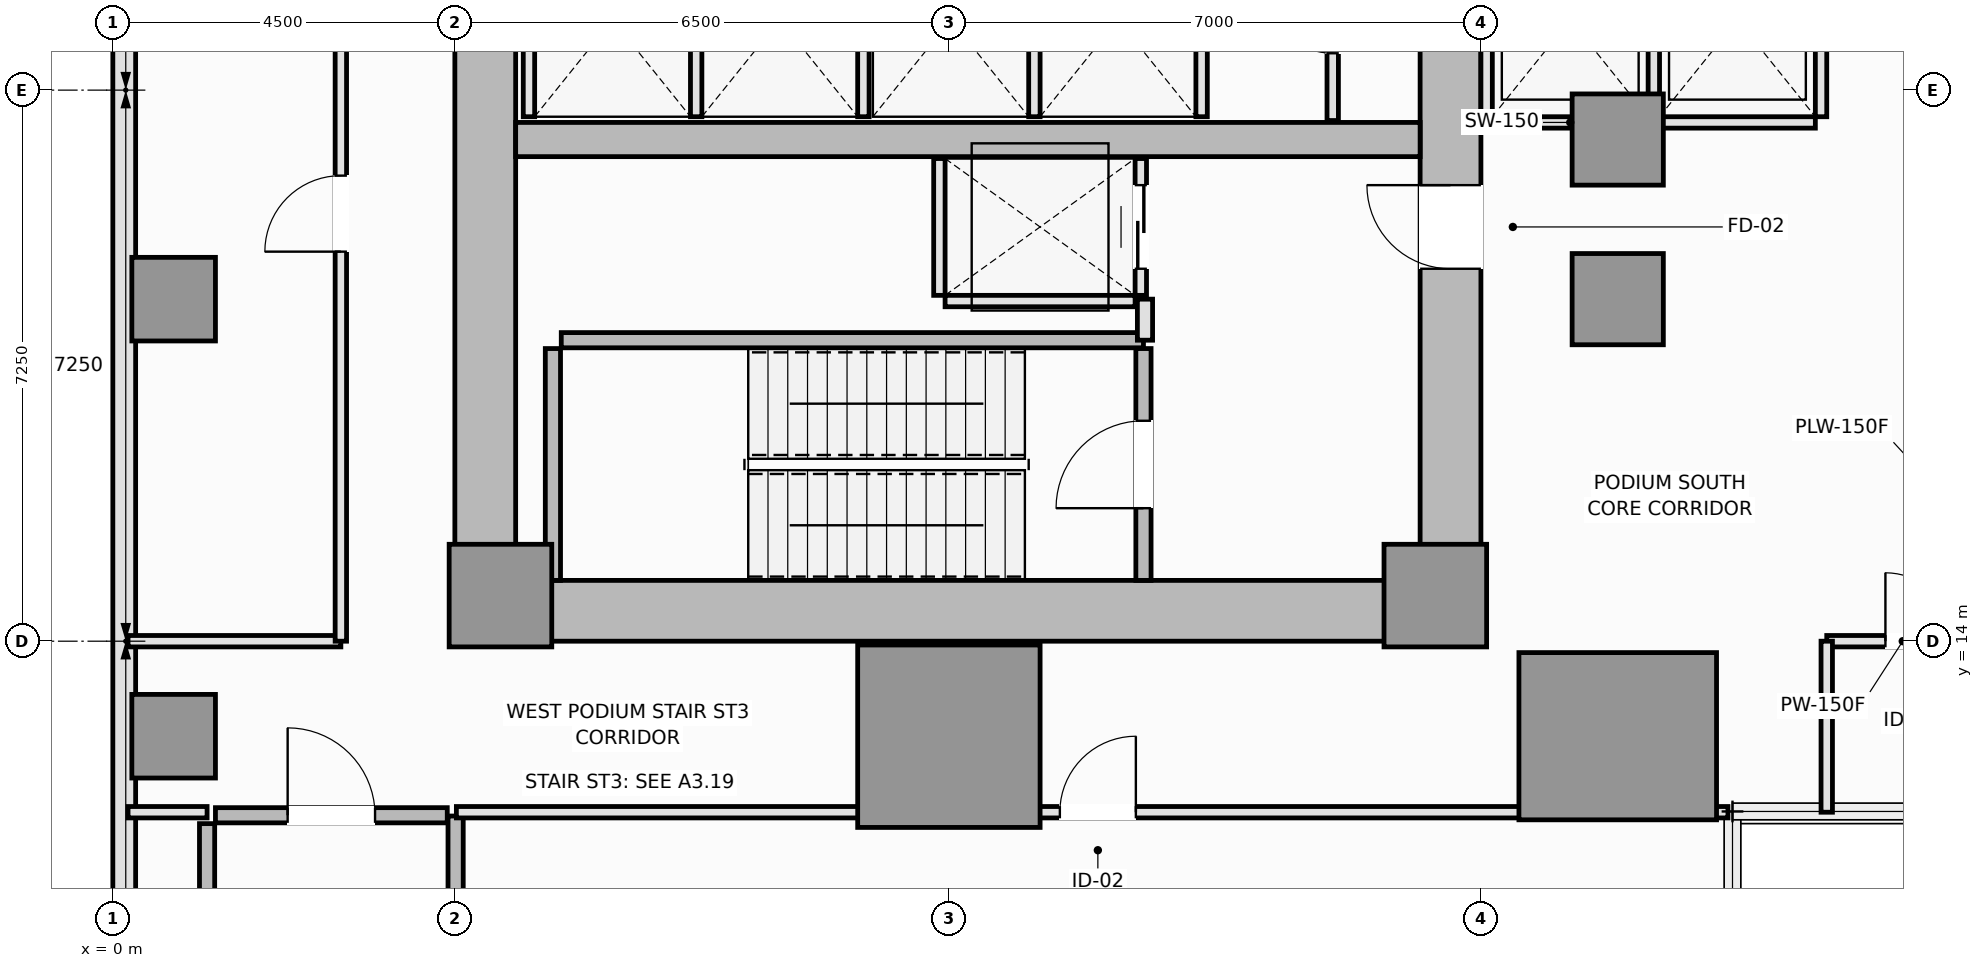
"""IFC4 building model, lengths in metres.
Left out: names, types, materials, properties, quantities, classifications, styles, units other than length and angle.
Written with IfcOpenShell. Run it as: python <this file> out.ifc"""

import sys

from ifc_helpers import new_model, si_unit, direction, frame, frame_2d, origin, origin_2d, place, context, subcontext, project, spatial, rectangle, extrude, element, fill, save


model = new_model("IFC4")
c1 = context("Model", 3, precision=1e-05, world=origin(), true_north=direction((0.0, 1.0)))
c2 = subcontext(c1, "Body", "Model", "MODEL_VIEW")
j1 = project(units=[si_unit("LENGTHUNIT", "METRE"), si_unit("PLANEANGLEUNIT", "RADIAN")], contexts=[c1])
p1 = place(None, origin())
s1 = spatial("IfcSite", under=j1, at=p1, CompositionType="ELEMENT")
p2 = place(p1, origin())
s2 = spatial("IfcBuilding", under=s1, at=p2, CompositionType="ELEMENT")
p3 = place(p2, frame((0.0, 0.0, 6.0)))
s3 = spatial("IfcBuildingStorey", under=s2, at=p3, CompositionType="ELEMENT", Elevation=6.0)
p4 = place(p3, frame((4.5, 14.4, 0.0), z_axis=(0.0, 0.0, 1.0), x_axis=(1.0, 0.0, 0.0)))
e1 = element("IfcWall", 1, at=p4, inside=s3, PredefinedType="SHEAR", context=c2, shape_type="SweptSolid", body=[
    extrude(rectangle(XDim=13.5, YDim=0.8, at=frame_2d((6.75, 0.0))), origin(), (0.0, 0.0, 1.0), 4.8),
])
p5 = place(p3, frame((4.9, 14.8, 0.0), z_axis=(0.0, 0.0, 1.0), x_axis=(0.0, 1.0, 0.0)))
e2 = element("IfcWall", 2, at=p5, inside=s3, PredefinedType="SHEAR", context=c2, shape_type="SweptSolid", body=[
    extrude(rectangle(XDim=20.9, YDim=0.8, at=frame_2d((10.45, 0.0))), origin(), (0.0, 0.0, 1.0), 4.8),
])
p6 = place(p3, frame((17.6, 14.8, 0.0), z_axis=(0.0, 0.0, 1.0), x_axis=(0.0, 1.0, 0.0)))
e3 = element("IfcWall", 3, at=p6, inside=s3, PredefinedType="SHEAR", context=c2, shape_type="SweptSolid", body=[
    extrude(rectangle(XDim=8.65, YDim=0.8, at=frame_2d((4.325, 0.0))), origin(), (0.0, 0.0, 1.0), 4.8),
])
p7 = place(p6, frame((4.1, 0.0, 0.0)))
e4 = element("IfcOpeningElement", 4, at=p7, cuts=e3, PredefinedType="OPENING", context=c2, shape_type="SweptSolid", body=[
    extrude(rectangle(XDim=1.1, YDim=2.15, at=frame_2d((0.55, 1.075))), frame((0.0, 0.41, 0.0), z_axis=(0.0, -1.0, 0.0), x_axis=(1.0, 0.0, 0.0)), (0.0, 0.0, 1.0), 0.82),
])
p8 = place(p3, frame((5.3, 20.6, 0.0), z_axis=(0.0, 0.0, 1.0), x_axis=(1.0, 0.0, 0.0)))
e5 = element("IfcWall", 5, at=p8, inside=s3, PredefinedType="SHEAR", context=c2, shape_type="SweptSolid", body=[
    extrude(rectangle(XDim=11.9, YDim=0.45, at=frame_2d((5.95, 0.0))), origin(), (0.0, 0.0, 1.0), 4.8),
])
for number, where, z_axis, x_axis in (
    (6, (5.1, 14.6, 0.0), (0.0, 0.0, 1.0), (1.0, 0.0, 0.0)),
    (7, (17.4, 14.6, 0.0), (0.0, 0.0, 1.0), (1.0, 0.0, 0.0)),
):
    element("IfcColumn", number, at=place(p3, frame(where, z_axis=z_axis, x_axis=x_axis)), inside=s3, PredefinedType="PILASTER", context=c2, shape_type="SweptSolid", body=[
        extrude(rectangle(XDim=1.35, YDim=1.35, at=origin_2d()), origin(), (0.0, 0.0, 1.0), 4.8),
    ])
p9 = place(p3, frame((11.0, 12.75, 0.0), z_axis=(0.0, 0.0, 1.0), x_axis=(1.0, 0.0, 0.0)))
e8 = element("IfcColumn", 8, at=p9, inside=s3, PredefinedType="COLUMN", context=c2, shape_type="SweptSolid", body=[
    extrude(rectangle(XDim=2.4, YDim=2.4, at=origin_2d()), origin(), (0.0, 0.0, 1.0), 4.8),
])
p10 = place(p3, frame((19.8, 12.75, 0.0), z_axis=(0.0, 0.0, 1.0), x_axis=(1.0, 0.0, 0.0)))
e9 = element("IfcColumn", 9, at=p10, inside=s3, PredefinedType="COLUMN", context=c2, shape_type="SweptSolid", body=[
    extrude(rectangle(XDim=2.6, YDim=2.2, at=origin_2d()), origin(), (0.0, 0.0, 1.0), 4.8),
])
for number, where, z_axis, x_axis in (
    (10, (19.8, 18.5, 0.0), (0.0, 0.0, 1.0), (1.0, 0.0, 0.0)),
    (11, (19.8, 20.6, 0.0), (0.0, 0.0, 1.0), (1.0, 0.0, 0.0)),
):
    element("IfcColumn", number, at=place(p3, frame(where, z_axis=z_axis, x_axis=x_axis)), inside=s3, PredefinedType="COLUMN", context=c2, shape_type="SweptSolid", body=[
        extrude(rectangle(XDim=1.2, YDim=1.2, at=origin_2d()), origin(), (0.0, 0.0, 1.0), 4.8),
    ])
for number, where, z_axis, x_axis in (
    (12, (0.8, 12.75, 0.0), (0.0, 0.0, 1.0), (1.0, 0.0, 0.0)),
    (13, (0.8, 18.5, 0.0), (0.0, 0.0, 1.0), (1.0, 0.0, 0.0)),
):
    element("IfcColumn", number, at=place(p3, frame(where, z_axis=z_axis, x_axis=x_axis)), inside=s3, PredefinedType="COLUMN", context=c2, shape_type="SweptSolid", body=[
        extrude(rectangle(XDim=1.1, YDim=1.1, at=origin_2d()), origin(), (0.0, 0.0, 1.0), 4.8),
    ])
p11 = place(p3, frame((0.15, 50.35, 0.0), z_axis=(0.0, 0.0, 1.0), x_axis=(0.0, -1.0, 0.0)))
e14 = element("IfcWall", 14, at=p11, inside=s3, PredefinedType="SOLIDWALL", context=c2, shape_type="SweptSolid", body=[
    extrude(rectangle(XDim=50.2, YDim=0.3, at=frame_2d((25.1, 0.0))), origin(), (0.0, 0.0, 1.0), 4.6),
])
p12 = place(p11, frame((6.5, 0.0, 0.9)))
e15 = element("IfcOpeningElement", 15, at=p12, cuts=e14, PredefinedType="OPENING", context=c2, shape_type="SweptSolid", body=[
    extrude(rectangle(XDim=2.6, YDim=2.2, at=frame_2d((1.3, 1.1))), frame((0.0, 0.16, 0.0), z_axis=(0.0, -1.0, 0.0), x_axis=(1.0, 0.0, 0.0)), (0.0, 0.0, 1.0), 0.32),
])
p13 = place(p11, frame((42.0, 0.0, 0.9)))
e16 = element("IfcOpeningElement", 16, at=p13, cuts=e14, PredefinedType="OPENING", context=c2, shape_type="SweptSolid", body=[
    extrude(rectangle(XDim=2.6, YDim=2.2, at=frame_2d((1.3, 1.1))), frame((0.0, 0.16, 0.0), z_axis=(0.0, -1.0, 0.0), x_axis=(1.0, 0.0, 0.0)), (0.0, 0.0, 1.0), 0.32),
])
p14 = place(p3, frame((5.79, 14.8, 0.0), z_axis=(0.0, 0.0, 1.0), x_axis=(0.0, 1.0, 0.0)))
e17 = element("IfcWall", 17, at=p14, inside=s3, PredefinedType="SOLIDWALL", context=c2, shape_type="SweptSolid", body=[
    extrude(rectangle(XDim=3.05, YDim=0.2, at=frame_2d((1.525, 0.0))), origin(), (0.0, 0.0, 1.0), 4.8),
])
p15 = place(p3, frame((5.9, 17.96, 0.0), z_axis=(0.0, 0.0, 1.0), x_axis=(1.0, 0.0, 0.0)))
e18 = element("IfcWall", 18, at=p15, inside=s3, PredefinedType="SOLIDWALL", context=c2, shape_type="SweptSolid", body=[
    extrude(rectangle(XDim=7.66, YDim=0.2, at=frame_2d((3.83, 0.0))), origin(), (0.0, 0.0, 1.0), 4.8),
])
p16 = place(p3, frame((13.56, 14.8, 0.0), z_axis=(0.0, 0.0, 1.0), x_axis=(0.0, 1.0, 0.0)))
e19 = element("IfcWall", 19, at=p16, inside=s3, PredefinedType="SOLIDWALL", context=c2, shape_type="SweptSolid", body=[
    extrude(rectangle(XDim=3.05, YDim=0.2, at=frame_2d((1.525, 0.0))), origin(), (0.0, 0.0, 1.0), 4.8),
])
p17 = place(p16, frame((0.95, 0.0, 0.0)))
e20 = element("IfcOpeningElement", 20, at=p17, cuts=e19, PredefinedType="OPENING", context=c2, shape_type="SweptSolid", body=[
    extrude(rectangle(XDim=1.15, YDim=2.15, at=frame_2d((0.575, 1.075))), frame((0.0, 0.11, 0.0), z_axis=(0.0, -1.0, 0.0), x_axis=(1.0, 0.0, 0.0)), (0.0, 0.0, 1.0), 0.22),
])
p18 = place(p3, frame((1.24, 4.05, 0.0), z_axis=(0.0, 0.0, 1.0), x_axis=(0.0, 1.0, 0.0)))
e21 = element("IfcWall", 21, at=p18, inside=s3, PredefinedType="SOLIDWALL", context=c2, shape_type="SweptSolid", body=[
    extrude(rectangle(XDim=7.55, YDim=0.2, at=frame_2d((3.775, 0.0))), origin(), (0.0, 0.0, 1.0), 4.8),
])
p19 = place(p3, frame((4.51, 4.05, 0.0), z_axis=(0.0, 0.0, 1.0), x_axis=(0.0, 1.0, 0.0)))
e22 = element("IfcWall", 22, at=p19, inside=s3, PredefinedType="SOLIDWALL", context=c2, shape_type="SweptSolid", body=[
    extrude(rectangle(XDim=7.65, YDim=0.2, at=frame_2d((3.825, 0.0))), origin(), (0.0, 0.0, 1.0), 4.8),
])
p20 = place(p3, frame((1.35, 11.71, 0.0), z_axis=(0.0, 0.0, 1.0), x_axis=(1.0, 0.0, 0.0)))
e23 = element("IfcWall", 23, at=p20, inside=s3, PredefinedType="SOLIDWALL", context=c2, shape_type="SweptSolid", body=[
    extrude(rectangle(XDim=3.05, YDim=0.2, at=frame_2d((1.525, 0.0))), origin(), (0.0, 0.0, 1.0), 4.8),
])
p21 = place(p20, frame((0.95, 0.0, 0.0)))
e24 = element("IfcOpeningElement", 24, at=p21, cuts=e23, PredefinedType="OPENING", context=c2, shape_type="SweptSolid", body=[
    extrude(rectangle(XDim=1.15, YDim=2.15, at=frame_2d((0.575, 1.075))), frame((0.0, 0.11, 0.0), z_axis=(0.0, -1.0, 0.0), x_axis=(1.0, 0.0, 0.0)), (0.0, 0.0, 1.0), 0.22),
])
p22 = place(p3, frame((18.15, 20.825, 0.0), z_axis=(0.0, 0.0, 1.0), x_axis=(1.0, 0.0, 0.0)))
e25 = element("IfcWall", 25, at=p22, inside=s3, PredefinedType="PARTITIONING", context=c2, shape_type="SweptSolid", body=[
    extrude(rectangle(XDim=2.05, YDim=0.15, at=frame_2d((1.025, 0.0))), origin(), (0.0, 0.0, 1.0), 4.6),
])
for number, where, z_axis, x_axis in (
    (26, (18.075, 20.9, 0.0), (0.0, 0.0, 1.0), (0.0, 1.0, 0.0)),
    (27, (20.275, 20.9, 0.0), (0.0, 0.0, 1.0), (0.0, 1.0, 0.0)),
):
    element("IfcWall", number, at=place(p3, frame(where, z_axis=z_axis, x_axis=x_axis)), inside=s3, PredefinedType="PARTITIONING", context=c2, shape_type="SweptSolid", body=[
        extrude(rectangle(XDim=2.55, YDim=0.15, at=frame_2d((1.275, 0.0))), origin(), (0.0, 0.0, 1.0), 4.6),
    ])
p23 = place(p3, frame((20.35, 20.825, 0.0), z_axis=(0.0, 0.0, 1.0), x_axis=(1.0, 0.0, 0.0)))
e28 = element("IfcWall", 28, at=p23, inside=s3, PredefinedType="PARTITIONING", context=c2, shape_type="SweptSolid", body=[
    extrude(rectangle(XDim=2.05, YDim=0.15, at=frame_2d((1.025, 0.0))), origin(), (0.0, 0.0, 1.0), 4.6),
])
for number, where, z_axis, x_axis in (
    (29, (22.475, 20.9, 0.0), (0.0, 0.0, 1.0), (0.0, 1.0, 0.0)),
    (30, (5.475, 20.9, 0.0), (0.0, 0.0, 1.0), (0.0, 1.0, 0.0)),
    (31, (7.675, 20.9, 0.0), (0.0, 0.0, 1.0), (0.0, 1.0, 0.0)),
    (32, (9.875, 20.9, 0.0), (0.0, 0.0, 1.0), (0.0, 1.0, 0.0)),
    (33, (12.125, 20.9, 0.0), (0.0, 0.0, 1.0), (0.0, 1.0, 0.0)),
    (34, (14.325, 20.9, 0.0), (0.0, 0.0, 1.0), (0.0, 1.0, 0.0)),
):
    element("IfcWall", number, at=place(p3, frame(where, z_axis=z_axis, x_axis=x_axis)), inside=s3, PredefinedType="PARTITIONING", context=c2, shape_type="SweptSolid", body=[
        extrude(rectangle(XDim=2.55, YDim=0.15, at=frame_2d((1.275, 0.0))), origin(), (0.0, 0.0, 1.0), 4.6),
    ])
p24 = place(p3, frame((10.95, 18.475, 0.0), z_axis=(0.0, 0.0, 1.0), x_axis=(1.0, 0.0, 0.0)))
e35 = element("IfcWall", 35, at=p24, inside=s3, PredefinedType="PARTITIONING", context=c2, shape_type="SweptSolid", body=[
    extrude(rectangle(XDim=2.5, YDim=0.15, at=frame_2d((1.25, 0.0))), origin(), (0.0, 0.0, 1.0), 4.6),
])
p25 = place(p3, frame((10.875, 18.55, 0.0), z_axis=(0.0, 0.0, 1.0), x_axis=(0.0, 1.0, 0.0)))
e36 = element("IfcWall", 36, at=p25, inside=s3, PredefinedType="PARTITIONING", context=c2, shape_type="SweptSolid", body=[
    extrude(rectangle(XDim=1.8, YDim=0.15, at=frame_2d((0.9, 0.0))), origin(), (0.0, 0.0, 1.0), 4.6),
])
p26 = place(p3, frame((13.525, 18.55, 0.0), z_axis=(0.0, 0.0, 1.0), x_axis=(0.0, 1.0, 0.0)))
e37 = element("IfcWall", 37, at=p26, inside=s3, PredefinedType="PARTITIONING", context=c2, shape_type="SweptSolid", body=[
    extrude(rectangle(XDim=1.8, YDim=0.15, at=frame_2d((0.9, 0.0))), origin(), (0.0, 0.0, 1.0), 4.6),
])
p27 = place(p26, frame((0.35, 0.0, 0.0)))
e38 = element("IfcOpeningElement", 38, at=p27, cuts=e37, PredefinedType="OPENING", context=c2, shape_type="SweptSolid", body=[
    extrude(rectangle(XDim=1.1, YDim=2.2, at=frame_2d((0.55, 1.1))), frame((0.0, 0.085, 0.0), z_axis=(0.0, -1.0, 0.0), x_axis=(1.0, 0.0, 0.0)), (0.0, 0.0, 1.0), 0.17),
])
p28 = place(p3, frame((13.58, 17.96, 0.0), z_axis=(0.0, 0.0, 1.0), x_axis=(0.0, 1.0, 0.0)))
e39 = element("IfcWall", 39, at=p28, inside=s3, PredefinedType="PARTITIONING", context=c2, shape_type="SweptSolid", body=[
    extrude(rectangle(XDim=0.54, YDim=0.2, at=frame_2d((0.27, 0.0))), origin(), (0.0, 0.0, 1.0), 4.6),
])
p29 = place(p3, frame((16.05, 20.85, 0.0), z_axis=(0.0, 0.0, 1.0), x_axis=(0.0, 1.0, 0.0)))
e40 = element("IfcWall", 40, at=p29, inside=s3, PredefinedType="PARTITIONING", context=c2, shape_type="SweptSolid", body=[
    extrude(rectangle(XDim=2.67, YDim=0.15, at=frame_2d((1.335, 0.0))), origin(), (0.0, 0.0, 1.0), 4.6),
])
p30 = place(p29, frame((0.885, 0.0, 0.0)))
e41 = element("IfcOpeningElement", 41, at=p30, cuts=e40, PredefinedType="OPENING", context=c2, shape_type="SweptSolid", body=[
    extrude(rectangle(XDim=0.9, YDim=2.1, at=frame_2d((0.45, 1.05))), frame((0.0, 0.085, 0.0), z_axis=(0.0, -1.0, 0.0), x_axis=(1.0, 0.0, 0.0)), (0.0, 0.0, 1.0), 0.17),
])
p31 = place(p3, frame((22.55, 14.0, 0.0), z_axis=(0.0, 0.0, 1.0), x_axis=(1.0, 0.0, 0.0)))
e42 = element("IfcWall", 42, at=p31, inside=s3, PredefinedType="PARTITIONING", context=c2, shape_type="SweptSolid", body=[
    extrude(rectangle(XDim=2.0, YDim=0.15, at=frame_2d((1.0, 0.0))), origin(), (0.0, 0.0, 1.0), 4.6),
])
p32 = place(p31, frame((0.772, 0.0, 0.0)))
e43 = element("IfcOpeningElement", 43, at=p32, cuts=e42, PredefinedType="OPENING", context=c2, shape_type="SweptSolid", body=[
    extrude(rectangle(XDim=0.9, YDim=2.1, at=frame_2d((0.45, 1.05))), frame((0.0, 0.085, 0.0), z_axis=(0.0, -1.0, 0.0), x_axis=(1.0, 0.0, 0.0)), (0.0, 0.0, 1.0), 0.17),
])
p33 = place(p3, frame((0.2, 11.75, 0.0), z_axis=(0.0, 0.0, 1.0), x_axis=(1.0, 0.0, 0.0)))
e44 = element("IfcWall", 44, at=p33, inside=s3, PredefinedType="PARTITIONING", context=c2, shape_type="SweptSolid", body=[
    extrude(rectangle(XDim=1.04, YDim=0.15, at=frame_2d((0.52, 0.0))), origin(), (0.0, 0.0, 1.0), 4.6),
])
p34 = place(p3, frame((4.52, 11.75, 0.0), z_axis=(0.0, 0.0, 1.0), x_axis=(1.0, 0.0, 0.0)))
e45 = element("IfcWall", 45, at=p34, inside=s3, PredefinedType="PARTITIONING", context=c2, shape_type="SweptSolid", body=[
    extrude(rectangle(XDim=16.73, YDim=0.15, at=frame_2d((8.365, 0.0))), origin(), (0.0, 0.0, 1.0), 4.6),
])
p35 = place(p34, frame((7.94, 0.0, 0.0)))
e46 = element("IfcOpeningElement", 46, at=p35, cuts=e45, PredefinedType="OPENING", context=c2, shape_type="SweptSolid", body=[
    extrude(rectangle(XDim=1.0, YDim=2.15, at=frame_2d((0.5, 1.075))), frame((0.0, 0.085, 0.0), z_axis=(0.0, -1.0, 0.0), x_axis=(1.0, 0.0, 0.0)), (0.0, 0.0, 1.0), 0.17),
])
p36 = place(p3, frame((0.2, 14.0, 0.0), z_axis=(0.0, 0.0, 1.0), x_axis=(1.0, 0.0, 0.0)))
e47 = element("IfcWall", 47, at=p36, inside=s3, PredefinedType="PARTITIONING", context=c2, shape_type="SweptSolid", body=[
    extrude(rectangle(XDim=2.8, YDim=0.15, at=frame_2d((1.4, 0.0))), origin(), (0.0, 0.0, 1.0), 4.6),
])
p37 = place(p3, frame((22.55, 11.75, 0.0), z_axis=(0.0, 0.0, 1.0), x_axis=(0.0, 1.0, 0.0)))
e48 = element("IfcWall", 48, at=p37, inside=s3, PredefinedType="PARTITIONING", context=c2, shape_type="SweptSolid", body=[
    extrude(rectangle(XDim=2.25, YDim=0.15, at=frame_2d((1.125, 0.0))), origin(), (0.0, 0.0, 1.0), 4.6),
])
p38 = place(p3, frame((3.0, 14.0, 0.0), z_axis=(0.0, 0.0, 1.0), x_axis=(0.0, 1.0, 0.0)))
e49 = element("IfcWall", 49, at=p38, inside=s3, PredefinedType="PARTITIONING", context=c2, shape_type="SweptSolid", body=[
    extrude(rectangle(XDim=11.25, YDim=0.15, at=frame_2d((5.625, 0.0))), origin(), (0.0, 0.0, 1.0), 4.6),
])
p39 = place(p38, frame((5.125, 0.0, 0.0)))
e50 = element("IfcOpeningElement", 50, at=p39, cuts=e49, PredefinedType="OPENING", context=c2, shape_type="SweptSolid", body=[
    extrude(rectangle(XDim=1.0, YDim=2.15, at=frame_2d((0.5, 1.075))), frame((0.0, 0.085, 0.0), z_axis=(0.0, -1.0, 0.0), x_axis=(1.0, 0.0, 0.0)), (0.0, 0.0, 1.0), 0.17),
])
p40 = place(p17, origin())
e51 = element("IfcDoor", 51, at=p40, inside=s3, OperationType="SINGLE_SWING_LEFT", PredefinedType="DOOR", context=c2, shape_type="SweptSolid", body=[
    extrude(rectangle(XDim=1.15, YDim=2.15, at=frame_2d((0.575, 1.075))), frame((0.0, 0.025, 0.0), z_axis=(0.0, -1.0, 0.0), x_axis=(1.0, 0.0, 0.0)), (0.0, 0.0, 1.0), 0.05),
])
fill(e20, e51)
p41 = place(p21, origin())
e52 = element("IfcDoor", 52, at=p41, inside=s3, OperationType="SINGLE_SWING_LEFT", PredefinedType="DOOR", context=c2, shape_type="SweptSolid", body=[
    extrude(rectangle(XDim=1.15, YDim=2.15, at=frame_2d((0.575, 1.075))), frame((0.0, 0.025, 0.0), z_axis=(0.0, -1.0, 0.0), x_axis=(1.0, 0.0, 0.0)), (0.0, 0.0, 1.0), 0.05),
])
fill(e24, e52)
p42 = place(p27, origin())
e53 = element("IfcDoor", 53, at=p42, inside=s3, OperationType="DOUBLE_DOOR_SLIDING", PredefinedType="DOOR", context=c2, shape_type="SweptSolid", body=[
    extrude(rectangle(XDim=1.1, YDim=2.2, at=frame_2d((0.55, 1.1))), frame((0.0, 0.025, 0.0), z_axis=(0.0, -1.0, 0.0), x_axis=(1.0, 0.0, 0.0)), (0.0, 0.0, 1.0), 0.05),
])
fill(e38, e53)
p43 = place(p7, origin())
e54 = element("IfcDoor", 54, at=p43, inside=s3, OperationType="SINGLE_SWING_RIGHT", PredefinedType="DOOR", context=c2, shape_type="SweptSolid", body=[
    extrude(rectangle(XDim=1.1, YDim=2.15, at=frame_2d((0.55, 1.075))), frame((0.0, 0.025, 0.0), z_axis=(0.0, -1.0, 0.0), x_axis=(1.0, 0.0, 0.0)), (0.0, 0.0, 1.0), 0.05),
])
fill(e4, e54)
p44 = place(p30, origin())
e55 = element("IfcDoor", 55, at=p44, inside=s3, OperationType="SINGLE_SWING_RIGHT", PredefinedType="DOOR", context=c2, shape_type="SweptSolid", body=[
    extrude(rectangle(XDim=0.9, YDim=2.1, at=frame_2d((0.45, 1.05))), frame((0.0, 0.025, 0.0), z_axis=(0.0, -1.0, 0.0), x_axis=(1.0, 0.0, 0.0)), (0.0, 0.0, 1.0), 0.05),
])
fill(e41, e55)
p45 = place(p32, origin())
e56 = element("IfcDoor", 56, at=p45, inside=s3, OperationType="SINGLE_SWING_LEFT", PredefinedType="DOOR", context=c2, shape_type="SweptSolid", body=[
    extrude(rectangle(XDim=0.9, YDim=2.1, at=frame_2d((0.45, 1.05))), frame((0.0, 0.025, 0.0), z_axis=(0.0, -1.0, 0.0), x_axis=(1.0, 0.0, 0.0)), (0.0, 0.0, 1.0), 0.05),
])
fill(e43, e56)
p46 = place(p35, origin())
e57 = element("IfcDoor", 57, at=p46, inside=s3, OperationType="SINGLE_SWING_RIGHT", PredefinedType="DOOR", context=c2, shape_type="SweptSolid", body=[
    extrude(rectangle(XDim=1.0, YDim=2.15, at=frame_2d((0.5, 1.075))), frame((0.0, 0.025, 0.0), z_axis=(0.0, -1.0, 0.0), x_axis=(1.0, 0.0, 0.0)), (0.0, 0.0, 1.0), 0.05),
])
fill(e46, e57)
p47 = place(p39, origin())
e58 = element("IfcDoor", 58, at=p47, inside=s3, OperationType="SINGLE_SWING_LEFT", PredefinedType="DOOR", context=c2, shape_type="SweptSolid", body=[
    extrude(rectangle(XDim=1.0, YDim=2.15, at=frame_2d((0.5, 1.075))), frame((0.0, 0.025, 0.0), z_axis=(0.0, -1.0, 0.0), x_axis=(1.0, 0.0, 0.0)), (0.0, 0.0, 1.0), 0.05),
])
fill(e50, e58)
save(model, sys.argv[1])
